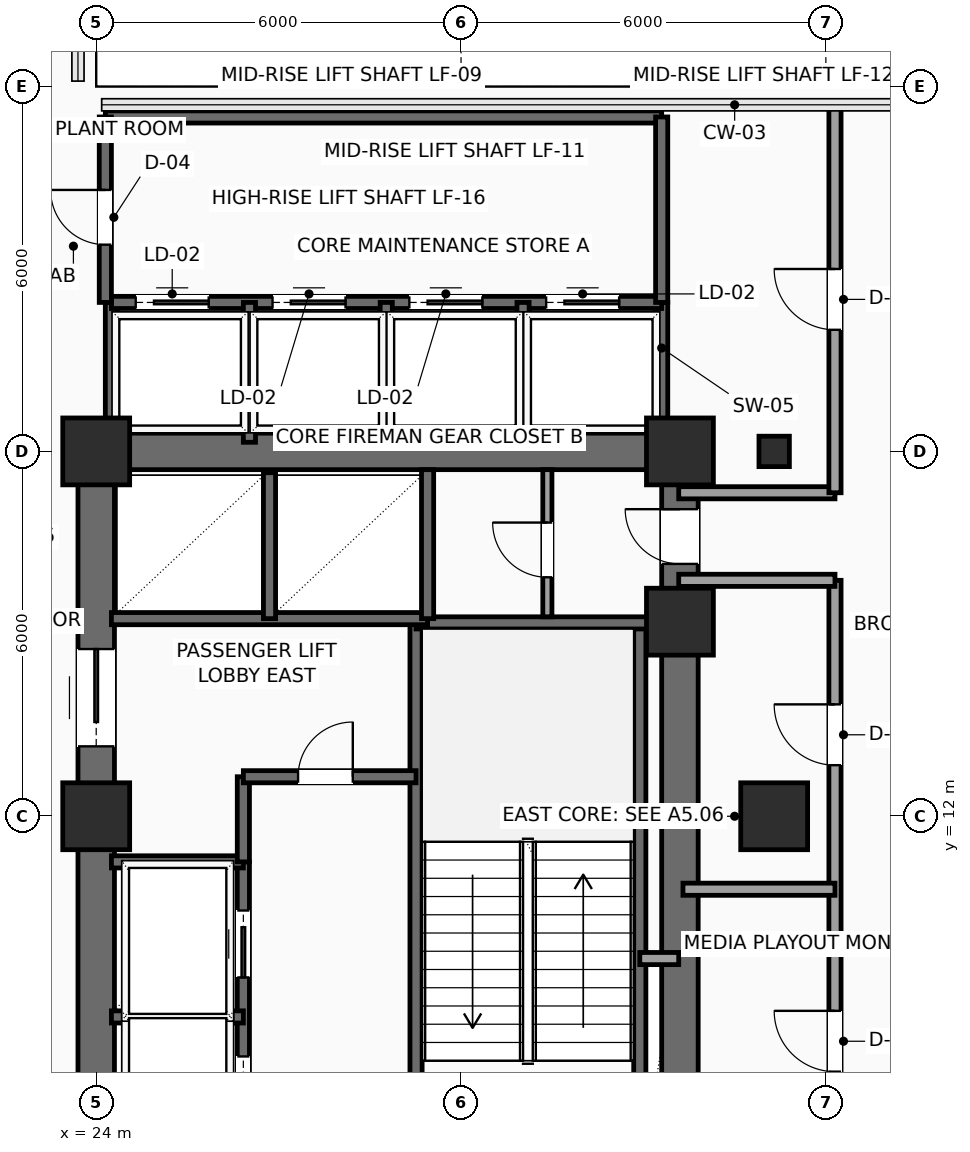
"""IFC4 building model, lengths in metres.
Left out: names, types, materials, properties, quantities, classifications, styles, units other than length and angle.
Written with IfcOpenShell. Run it as: python <this file> out.ifc"""

import sys

from ifc_helpers import new_model, si_unit, direction, frame, frame_2d, origin, origin_2d, place, context, subcontext, project, spatial, rectangle, hollow_rectangle, extrude, element, fill, save


model = new_model("IFC4")
c1 = context("Model", 3, precision=1e-05, world=origin(), true_north=direction((0.0, 1.0)))
c2 = subcontext(c1, "Body", "Model", "MODEL_VIEW")
j1 = project(units=[si_unit("LENGTHUNIT", "METRE"), si_unit("PLANEANGLEUNIT", "RADIAN")], contexts=[c1])
p1 = place(None, origin())
s1 = spatial("IfcSite", under=j1, at=p1, CompositionType="ELEMENT")
p2 = place(p1, origin())
s2 = spatial("IfcBuilding", under=s1, at=p2, CompositionType="ELEMENT")
p3 = place(p2, frame((0.0, 0.0, 115.65)))
s3 = spatial("IfcBuildingStorey", under=s2, at=p3, CompositionType="ELEMENT", Elevation=115.65)
for number, where, z_axis, x_axis in (
    (1, (24.0, 12.0, 0.0), (0.0, 0.0, 1.0), (1.0, 0.0, 0.0)),
    (2, (24.0, 18.0, 0.0), (0.0, 0.0, 1.0), (1.0, 0.0, 0.0)),
    (3, (33.6, 15.2, 0.0), (0.0, 0.0, 1.0), (1.0, 0.0, 0.0)),
    (4, (33.6, 18.0, 0.0), (0.0, 0.0, 1.0), (1.0, 0.0, 0.0)),
    (5, (35.15, 12.0, 0.0), (0.0, 0.0, 1.0), (1.0, 0.0, 0.0)),
):
    element("IfcColumn", number, at=place(p3, frame(where, z_axis=z_axis, x_axis=x_axis)), inside=s3, PredefinedType="COLUMN", context=c2, shape_type="SweptSolid", body=[
        extrude(rectangle(XDim=1.1, YDim=1.1, at=origin_2d()), origin(), (0.0, 0.0, 1.0), 3.75),
    ])
p4 = place(p3, frame((35.15, 18.0, 0.0), z_axis=(0.0, 0.0, 1.0), x_axis=(1.0, 0.0, 0.0)))
e6 = element("IfcColumn", 6, at=p4, inside=s3, PredefinedType="COLUMN", context=c2, shape_type="SweptSolid", body=[
    extrude(hollow_rectangle(XDim=0.5, YDim=0.5, WallThickness=0.025, InnerFilletRadius=0.025, OuterFilletRadius=0.04, at=origin_2d()), origin(), (0.0, 0.0, 1.0), 3.75),
])
p5 = place(p3, frame((24.0, 18.0, 0.0), z_axis=(0.0, 0.0, 1.0), x_axis=(1.0, 0.0, 0.0)))
e7 = element("IfcWall", 7, at=p5, inside=s3, PredefinedType="SHEAR", context=c2, shape_type="SweptSolid", body=[
    extrude(rectangle(XDim=9.6, YDim=0.6, at=frame_2d((4.8, 0.0))), origin(), (0.0, 0.0, 1.0), 3.525),
])
p6 = place(p3, frame((24.0, 6.0, 0.0), z_axis=(0.0, 0.0, 1.0), x_axis=(0.0, 1.0, 0.0)))
e8 = element("IfcWall", 8, at=p6, inside=s3, PredefinedType="SHEAR", context=c2, shape_type="SweptSolid", body=[
    extrude(rectangle(XDim=12.0, YDim=0.6, at=frame_2d((6.0, 0.0))), origin(), (0.0, 0.0, 1.0), 3.525),
])
p7 = place(p6, frame((7.15, 0.0, 0.0)))
e9 = element("IfcOpeningElement", 9, at=p7, cuts=e8, PredefinedType="OPENING", context=c2, shape_type="SweptSolid", body=[
    extrude(rectangle(XDim=1.6, YDim=2.3, at=frame_2d((0.8, 1.15))), frame((0.0, 0.31, 0.0), z_axis=(0.0, -1.0, 0.0), x_axis=(1.0, 0.0, 0.0)), (0.0, 0.0, 1.0), 0.62),
])
p8 = place(p3, frame((33.6, 6.0, 0.0), z_axis=(0.0, 0.0, 1.0), x_axis=(0.0, 1.0, 0.0)))
e10 = element("IfcWall", 10, at=p8, inside=s3, PredefinedType="SHEAR", context=c2, shape_type="SweptSolid", body=[
    extrude(rectangle(XDim=12.0, YDim=0.6, at=frame_2d((6.0, 0.0))), origin(), (0.0, 0.0, 1.0), 3.525),
])
p9 = place(p8, frame((10.15, 0.0, 0.0)))
e11 = element("IfcOpeningElement", 11, at=p9, cuts=e10, PredefinedType="OPENING", context=c2, shape_type="SweptSolid", body=[
    extrude(rectangle(XDim=0.9, YDim=2.15, at=frame_2d((0.45, 1.075))), frame((0.0, 0.31, 0.0), z_axis=(0.0, -1.0, 0.0), x_axis=(1.0, 0.0, 0.0)), (0.0, 0.0, 1.0), 0.62),
])
p10 = place(p3, frame((29.26, 6.3, 0.0), z_axis=(0.0, 0.0, 1.0), x_axis=(0.0, 1.0, 0.0)))
e12 = element("IfcWall", 12, at=p10, inside=s3, PredefinedType="SHEAR", context=c2, shape_type="SweptSolid", body=[
    extrude(rectangle(XDim=8.88, YDim=0.2, at=frame_2d((4.44, 0.0))), origin(), (0.0, 0.0, 1.0), 3.525),
])
p11 = place(p10, frame((0.35, 0.0, 0.0)))
e13 = element("IfcOpeningElement", 13, at=p11, cuts=e12, PredefinedType="OPENING", context=c2, shape_type="SweptSolid", body=[
    extrude(rectangle(XDim=1.1, YDim=2.2, at=frame_2d((0.55, 1.1))), frame((0.0, 0.11, 0.0), z_axis=(0.0, -1.0, 0.0), x_axis=(1.0, 0.0, 0.0)), (0.0, 0.0, 1.0), 0.22),
])
p12 = place(p3, frame((32.94, 6.3, 0.0), z_axis=(0.0, 0.0, 1.0), x_axis=(0.0, 1.0, 0.0)))
e14 = element("IfcWall", 14, at=p12, inside=s3, PredefinedType="SHEAR", context=c2, shape_type="SweptSolid", body=[
    extrude(rectangle(XDim=8.88, YDim=0.2, at=frame_2d((4.44, 0.0))), origin(), (0.0, 0.0, 1.0), 3.525),
])
p13 = place(p3, frame((29.26, 15.18, 0.0), z_axis=(0.0, 0.0, 1.0), x_axis=(1.0, 0.0, 0.0)))
e15 = element("IfcWall", 15, at=p13, inside=s3, PredefinedType="SHEAR", context=c2, shape_type="SweptSolid", body=[
    extrude(rectangle(XDim=4.04, YDim=0.2, at=frame_2d((2.02, 0.0))), origin(), (0.0, 0.0, 1.0), 3.525),
])
p14 = place(p3, frame((26.42, 6.3, 0.0), z_axis=(0.0, 0.0, 1.0), x_axis=(0.0, 1.0, 0.0)))
e16 = element("IfcWall", 16, at=p14, inside=s3, PredefinedType="SHEAR", context=c2, shape_type="SweptSolid", body=[
    extrude(rectangle(XDim=4.95, YDim=0.2, at=frame_2d((2.475, 0.0))), origin(), (0.0, 0.0, 1.0), 3.525),
])
p15 = place(p14, frame((0.65, 0.0, 0.0)))
e17 = element("IfcOpeningElement", 17, at=p15, cuts=e16, PredefinedType="OPENING", context=c2, shape_type="SweptSolid", body=[
    extrude(rectangle(XDim=1.1, YDim=2.2, at=frame_2d((0.55, 1.1))), frame((0.0, 0.11, 0.0), z_axis=(0.0, -1.0, 0.0), x_axis=(1.0, 0.0, 0.0)), (0.0, 0.0, 1.0), 0.22),
])
p16 = place(p14, frame((3.05, 0.0, 0.0)))
e18 = element("IfcOpeningElement", 18, at=p16, cuts=e16, PredefinedType="OPENING", context=c2, shape_type="SweptSolid", body=[
    extrude(rectangle(XDim=1.1, YDim=2.2, at=frame_2d((0.55, 1.1))), frame((0.0, 0.11, 0.0), z_axis=(0.0, -1.0, 0.0), x_axis=(1.0, 0.0, 0.0)), (0.0, 0.0, 1.0), 0.22),
])
for number, where, z_axis, x_axis in (
    (19, (24.25, 8.7, 0.0), (0.0, 0.0, 1.0), (1.0, 0.0, 0.0)),
    (20, (24.25, 11.25, 0.0), (0.0, 0.0, 1.0), (1.0, 0.0, 0.0)),
):
    element("IfcWall", number, at=place(p3, frame(where, z_axis=z_axis, x_axis=x_axis)), inside=s3, PredefinedType="SHEAR", context=c2, shape_type="SweptSolid", body=[
        extrude(rectangle(XDim=2.17, YDim=0.2, at=frame_2d((1.085, 0.0))), origin(), (0.0, 0.0, 1.0), 3.525),
    ])
p17 = place(p3, frame((26.42, 11.25, 0.0), z_axis=(0.0, 0.0, 1.0), x_axis=(0.0, 1.0, 0.0)))
e21 = element("IfcWall", 21, at=p17, inside=s3, PredefinedType="SHEAR", context=c2, shape_type="SweptSolid", body=[
    extrude(rectangle(XDim=1.4, YDim=0.2, at=frame_2d((0.7, 0.0))), origin(), (0.0, 0.0, 1.0), 3.525),
])
p18 = place(p3, frame((26.42, 12.65, 0.0), z_axis=(0.0, 0.0, 1.0), x_axis=(1.0, 0.0, 0.0)))
e22 = element("IfcWall", 22, at=p18, inside=s3, PredefinedType="SHEAR", context=c2, shape_type="SweptSolid", body=[
    extrude(rectangle(XDim=2.84, YDim=0.2, at=frame_2d((1.42, 0.0))), origin(), (0.0, 0.0, 1.0), 3.525),
])
p19 = place(p18, frame((0.9, 0.0, 0.0)))
e23 = element("IfcOpeningElement", 23, at=p19, cuts=e22, PredefinedType="OPENING", context=c2, shape_type="SweptSolid", body=[
    extrude(rectangle(XDim=0.9, YDim=2.15, at=frame_2d((0.45, 1.075))), frame((0.0, 0.11, 0.0), z_axis=(0.0, -1.0, 0.0), x_axis=(1.0, 0.0, 0.0)), (0.0, 0.0, 1.0), 0.22),
])
p20 = place(p3, frame((32.94, 9.66, 0.0), z_axis=(0.0, 0.0, 1.0), x_axis=(1.0, 0.0, 0.0)))
e24 = element("IfcWall", 24, at=p20, inside=s3, PredefinedType="SOLIDWALL", context=c2, shape_type="SweptSolid", body=[
    extrude(rectangle(XDim=0.64, YDim=0.2, at=frame_2d((0.32, 0.0))), origin(), (0.0, 0.0, 1.0), 3.525),
])
p21 = place(p3, frame((24.25, 15.25, 0.0), z_axis=(0.0, 0.0, 1.0), x_axis=(1.0, 0.0, 0.0)))
e25 = element("IfcWall", 25, at=p21, inside=s3, PredefinedType="SHEAR", context=c2, shape_type="SweptSolid", body=[
    extrude(rectangle(XDim=5.2, YDim=0.2, at=frame_2d((2.6, 0.0))), origin(), (0.0, 0.0, 1.0), 3.525),
])
p22 = place(p3, frame((26.85, 15.25, 0.0), z_axis=(0.0, 0.0, 1.0), x_axis=(0.0, 1.0, 0.0)))
e26 = element("IfcWall", 26, at=p22, inside=s3, PredefinedType="SHEAR", context=c2, shape_type="SweptSolid", body=[
    extrude(rectangle(XDim=2.4, YDim=0.2, at=frame_2d((1.2, 0.0))), origin(), (0.0, 0.0, 1.0), 3.525),
])
p23 = place(p3, frame((29.45, 15.25, 0.0), z_axis=(0.0, 0.0, 1.0), x_axis=(0.0, 1.0, 0.0)))
e27 = element("IfcWall", 27, at=p23, inside=s3, PredefinedType="SHEAR", context=c2, shape_type="SweptSolid", body=[
    extrude(rectangle(XDim=2.45, YDim=0.2, at=frame_2d((1.225, 0.0))), origin(), (0.0, 0.0, 1.0), 3.525),
])
p24 = place(p3, frame((31.42, 15.28, 0.0), z_axis=(0.0, 0.0, 1.0), x_axis=(0.0, 1.0, 0.0)))
e28 = element("IfcWall", 28, at=p24, inside=s3, PredefinedType="PARTITIONING", context=c2, shape_type="SweptSolid", body=[
    extrude(rectangle(XDim=2.42, YDim=0.15, at=frame_2d((1.21, 0.0))), origin(), (0.0, 0.0, 1.0), 3.525),
])
p25 = place(p24, frame((0.65, 0.0, 0.0)))
e29 = element("IfcOpeningElement", 29, at=p25, cuts=e28, PredefinedType="OPENING", context=c2, shape_type="SweptSolid", body=[
    extrude(rectangle(XDim=0.9, YDim=2.15, at=frame_2d((0.45, 1.075))), frame((0.0, 0.085, 0.0), z_axis=(0.0, -1.0, 0.0), x_axis=(1.0, 0.0, 0.0)), (0.0, 0.0, 1.0), 0.17),
])
for number, where, z_axis, x_axis in (
    (30, (33.3, 18.1, 0.0), (0.0, 0.0, 1.0), (0.0, 1.0, 0.0)),
    (31, (24.25, 18.1, 0.0), (0.0, 0.0, 1.0), (0.0, 1.0, 0.0)),
):
    element("IfcWall", number, at=place(p3, frame(where, z_axis=z_axis, x_axis=x_axis)), inside=s3, PredefinedType="SHEAR", context=c2, shape_type="SweptSolid", body=[
        extrude(rectangle(XDim=2.35, YDim=0.2, at=frame_2d((1.175, 0.0))), origin(), (0.0, 0.0, 1.0), 3.525),
    ])
p26 = place(p3, frame((24.25, 20.45, 0.0), z_axis=(0.0, 0.0, 1.0), x_axis=(1.0, 0.0, 0.0)))
e32 = element("IfcWall", 32, at=p26, inside=s3, PredefinedType="SHEAR", context=c2, shape_type="SweptSolid", body=[
    extrude(rectangle(XDim=9.05, YDim=0.2, at=frame_2d((4.525, 0.0))), origin(), (0.0, 0.0, 1.0), 3.525),
])
p27 = place(p26, frame((0.4, 0.0, 0.0)))
e33 = element("IfcOpeningElement", 33, at=p27, cuts=e32, PredefinedType="OPENING", context=c2, shape_type="SweptSolid", body=[
    extrude(rectangle(XDim=1.2, YDim=2.2, at=frame_2d((0.6, 1.1))), frame((0.0, 0.11, 0.0), z_axis=(0.0, -1.0, 0.0), x_axis=(1.0, 0.0, 0.0)), (0.0, 0.0, 1.0), 0.22),
])
p28 = place(p26, frame((2.65, 0.0, 0.0)))
e34 = element("IfcOpeningElement", 34, at=p28, cuts=e32, PredefinedType="OPENING", context=c2, shape_type="SweptSolid", body=[
    extrude(rectangle(XDim=1.2, YDim=2.2, at=frame_2d((0.6, 1.1))), frame((0.0, 0.11, 0.0), z_axis=(0.0, -1.0, 0.0), x_axis=(1.0, 0.0, 0.0)), (0.0, 0.0, 1.0), 0.22),
])
p29 = place(p26, frame((4.9, 0.0, 0.0)))
e35 = element("IfcOpeningElement", 35, at=p29, cuts=e32, PredefinedType="OPENING", context=c2, shape_type="SweptSolid", body=[
    extrude(rectangle(XDim=1.2, YDim=2.2, at=frame_2d((0.6, 1.1))), frame((0.0, 0.11, 0.0), z_axis=(0.0, -1.0, 0.0), x_axis=(1.0, 0.0, 0.0)), (0.0, 0.0, 1.0), 0.22),
])
p30 = place(p26, frame((7.15, 0.0, 0.0)))
e36 = element("IfcOpeningElement", 36, at=p30, cuts=e32, PredefinedType="OPENING", context=c2, shape_type="SweptSolid", body=[
    extrude(rectangle(XDim=1.2, YDim=2.2, at=frame_2d((0.6, 1.1))), frame((0.0, 0.11, 0.0), z_axis=(0.0, -1.0, 0.0), x_axis=(1.0, 0.0, 0.0)), (0.0, 0.0, 1.0), 0.22),
])
for number, where, z_axis, x_axis in (
    (37, (26.52, 18.15, 0.0), (0.0, 0.0, 1.0), (0.0, 1.0, 0.0)),
    (38, (28.77, 18.15, 0.0), (0.0, 0.0, 1.0), (0.0, 1.0, 0.0)),
    (39, (31.02, 18.15, 0.0), (0.0, 0.0, 1.0), (0.0, 1.0, 0.0)),
):
    element("IfcWall", number, at=place(p3, frame(where, z_axis=z_axis, x_axis=x_axis)), inside=s3, PredefinedType="SHEAR", context=c2, shape_type="SweptSolid", body=[
        extrude(rectangle(XDim=2.3, YDim=0.2, at=frame_2d((1.15, 0.0))), origin(), (0.0, 0.0, 1.0), 3.525),
    ])
p31 = place(p3, frame((24.15, 23.5, 0.0), z_axis=(0.0, 0.0, 1.0), x_axis=(1.0, 0.0, 0.0)))
e40 = element("IfcWall", 40, at=p31, inside=s3, PredefinedType="SHEAR", context=c2, shape_type="SweptSolid", body=[
    extrude(rectangle(XDim=9.15, YDim=0.2, at=frame_2d((4.575, 0.0))), origin(), (0.0, 0.0, 1.0), 3.525),
])
p32 = place(p3, frame((33.3, 20.45, 0.0), z_axis=(0.0, 0.0, 1.0), x_axis=(0.0, 1.0, 0.0)))
e41 = element("IfcWall", 41, at=p32, inside=s3, PredefinedType="SHEAR", context=c2, shape_type="SweptSolid", body=[
    extrude(rectangle(XDim=3.05, YDim=0.2, at=frame_2d((1.525, 0.0))), origin(), (0.0, 0.0, 1.0), 3.525),
])
p33 = place(p3, frame((24.15, 20.45, 0.0), z_axis=(0.0, 0.0, 1.0), x_axis=(0.0, 1.0, 0.0)))
e42 = element("IfcWall", 42, at=p33, inside=s3, PredefinedType="SHEAR", context=c2, shape_type="SweptSolid", body=[
    extrude(rectangle(XDim=3.05, YDim=0.2, at=frame_2d((1.525, 0.0))), origin(), (0.0, 0.0, 1.0), 3.525),
])
p34 = place(p33, frame((0.95, 0.0, 0.0)))
e43 = element("IfcOpeningElement", 43, at=p34, cuts=e42, PredefinedType="OPENING", context=c2, shape_type="SweptSolid", body=[
    extrude(rectangle(XDim=0.9, YDim=2.15, at=frame_2d((0.45, 1.075))), frame((0.0, 0.11, 0.0), z_axis=(0.0, -1.0, 0.0), x_axis=(1.0, 0.0, 0.0)), (0.0, 0.0, 1.0), 0.22),
])
p35 = place(p3, frame((36.15, 5.8, 0.0), z_axis=(0.0, 0.0, 1.0), x_axis=(0.0, 1.0, 0.0)))
e44 = element("IfcWall", 44, at=p35, inside=s3, PredefinedType="SOLIDWALL", context=c2, shape_type="SweptSolid", body=[
    extrude(rectangle(XDim=10.08, YDim=0.2, at=frame_2d((5.04, 0.0))), origin(), (0.0, 0.0, 1.0), 3.525),
])
p36 = place(p35, frame((2.0, 0.0, 0.0)))
e45 = element("IfcOpeningElement", 45, at=p36, cuts=e44, PredefinedType="OPENING", context=c2, shape_type="SweptSolid", body=[
    extrude(rectangle(XDim=1.0, YDim=2.2, at=frame_2d((0.5, 1.1))), frame((0.0, 0.11, 0.0), z_axis=(0.0, -1.0, 0.0), x_axis=(1.0, 0.0, 0.0)), (0.0, 0.0, 1.0), 0.22),
])
p37 = place(p35, frame((7.04, 0.0, 0.0)))
e46 = element("IfcOpeningElement", 46, at=p37, cuts=e44, PredefinedType="OPENING", context=c2, shape_type="SweptSolid", body=[
    extrude(rectangle(XDim=1.0, YDim=2.2, at=frame_2d((0.5, 1.1))), frame((0.0, 0.11, 0.0), z_axis=(0.0, -1.0, 0.0), x_axis=(1.0, 0.0, 0.0)), (0.0, 0.0, 1.0), 0.22),
])
for number, where, z_axis, x_axis in (
    (47, (36.15, 15.88, 0.0), (0.0, 0.0, 1.0), (-1.0, 0.0, 0.0)),
    (48, (33.58, 17.32, 0.0), (0.0, 0.0, 1.0), (1.0, 0.0, 0.0)),
):
    element("IfcWall", number, at=place(p3, frame(where, z_axis=z_axis, x_axis=x_axis)), inside=s3, PredefinedType="SOLIDWALL", context=c2, shape_type="SweptSolid", body=[
        extrude(rectangle(XDim=2.57, YDim=0.2, at=frame_2d((1.285, 0.0))), origin(), (0.0, 0.0, 1.0), 3.525),
    ])
p38 = place(p3, frame((36.15, 17.32, 0.0), z_axis=(0.0, 0.0, 1.0), x_axis=(0.0, 1.0, 0.0)))
e49 = element("IfcWall", 49, at=p38, inside=s3, PredefinedType="SOLIDWALL", context=c2, shape_type="SweptSolid", body=[
    extrude(rectangle(XDim=6.38, YDim=0.2, at=frame_2d((3.19, 0.0))), origin(), (0.0, 0.0, 1.0), 3.525),
])
p39 = place(p38, frame((2.68, 0.0, 0.0)))
e50 = element("IfcOpeningElement", 50, at=p39, cuts=e49, PredefinedType="OPENING", context=c2, shape_type="SweptSolid", body=[
    extrude(rectangle(XDim=1.0, YDim=2.2, at=frame_2d((0.5, 1.1))), frame((0.0, 0.11, 0.0), z_axis=(0.0, -1.0, 0.0), x_axis=(1.0, 0.0, 0.0)), (0.0, 0.0, 1.0), 0.22),
])
p40 = place(p3, frame((33.65, 10.8, 0.0), z_axis=(0.0, 0.0, 1.0), x_axis=(1.0, 0.0, 0.0)))
e51 = element("IfcWall", 51, at=p40, inside=s3, PredefinedType="PARTITIONING", context=c2, shape_type="SweptSolid", body=[
    extrude(rectangle(XDim=2.5, YDim=0.2, at=frame_2d((1.25, 0.0))), origin(), (0.0, 0.0, 1.0), 3.525),
])
p41 = place(p7, origin())
e52 = element("IfcDoor", 52, at=p41, inside=s3, OperationType="DOUBLE_DOOR_SLIDING", PredefinedType="DOOR", context=c2, shape_type="SweptSolid", body=[
    extrude(rectangle(XDim=1.6, YDim=2.3, at=frame_2d((0.8, 1.15))), frame((0.0, 0.025, 0.0), z_axis=(0.0, -1.0, 0.0), x_axis=(1.0, 0.0, 0.0)), (0.0, 0.0, 1.0), 0.05),
])
fill(e9, e52)
p42 = place(p9, origin())
e53 = element("IfcDoor", 53, at=p42, inside=s3, OperationType="SINGLE_SWING_RIGHT", PredefinedType="DOOR", context=c2, shape_type="SweptSolid", body=[
    extrude(rectangle(XDim=0.9, YDim=2.15, at=frame_2d((0.45, 1.075))), frame((0.0, 0.025, 0.0), z_axis=(0.0, -1.0, 0.0), x_axis=(1.0, 0.0, 0.0)), (0.0, 0.0, 1.0), 0.05),
])
fill(e11, e53)
p43 = place(p15, origin())
e54 = element("IfcDoor", 54, at=p43, inside=s3, OperationType="SLIDING_TO_LEFT", PredefinedType="DOOR", context=c2, shape_type="SweptSolid", body=[
    extrude(rectangle(XDim=1.1, YDim=2.2, at=frame_2d((0.55, 1.1))), frame((0.0, 0.025, 0.0), z_axis=(0.0, -1.0, 0.0), x_axis=(1.0, 0.0, 0.0)), (0.0, 0.0, 1.0), 0.05),
])
fill(e17, e54)
p44 = place(p16, origin())
e55 = element("IfcDoor", 55, at=p44, inside=s3, OperationType="SLIDING_TO_LEFT", PredefinedType="DOOR", context=c2, shape_type="SweptSolid", body=[
    extrude(rectangle(XDim=1.1, YDim=2.2, at=frame_2d((0.55, 1.1))), frame((0.0, 0.025, 0.0), z_axis=(0.0, -1.0, 0.0), x_axis=(1.0, 0.0, 0.0)), (0.0, 0.0, 1.0), 0.05),
])
fill(e18, e55)
p45 = place(p19, origin())
e56 = element("IfcDoor", 56, at=p45, inside=s3, OperationType="SINGLE_SWING_RIGHT", PredefinedType="DOOR", context=c2, shape_type="SweptSolid", body=[
    extrude(rectangle(XDim=0.9, YDim=2.15, at=frame_2d((0.45, 1.075))), frame((0.0, 0.025, 0.0), z_axis=(0.0, -1.0, 0.0), x_axis=(1.0, 0.0, 0.0)), (0.0, 0.0, 1.0), 0.05),
])
fill(e23, e56)
p46 = place(p25, origin())
e57 = element("IfcDoor", 57, at=p46, inside=s3, OperationType="SINGLE_SWING_RIGHT", PredefinedType="DOOR", context=c2, shape_type="SweptSolid", body=[
    extrude(rectangle(XDim=0.9, YDim=2.15, at=frame_2d((0.45, 1.075))), frame((0.0, 0.025, 0.0), z_axis=(0.0, -1.0, 0.0), x_axis=(1.0, 0.0, 0.0)), (0.0, 0.0, 1.0), 0.05),
])
fill(e29, e57)
p47 = place(p27, origin())
e58 = element("IfcDoor", 58, at=p47, inside=s3, OperationType="SLIDING_TO_RIGHT", PredefinedType="DOOR", context=c2, shape_type="SweptSolid", body=[
    extrude(rectangle(XDim=1.2, YDim=2.2, at=frame_2d((0.6, 1.1))), frame((0.0, 0.025, 0.0), z_axis=(0.0, -1.0, 0.0), x_axis=(1.0, 0.0, 0.0)), (0.0, 0.0, 1.0), 0.05),
])
fill(e33, e58)
p48 = place(p28, origin())
e59 = element("IfcDoor", 59, at=p48, inside=s3, OperationType="SLIDING_TO_RIGHT", PredefinedType="DOOR", context=c2, shape_type="SweptSolid", body=[
    extrude(rectangle(XDim=1.2, YDim=2.2, at=frame_2d((0.6, 1.1))), frame((0.0, 0.025, 0.0), z_axis=(0.0, -1.0, 0.0), x_axis=(1.0, 0.0, 0.0)), (0.0, 0.0, 1.0), 0.05),
])
fill(e34, e59)
p49 = place(p29, origin())
e60 = element("IfcDoor", 60, at=p49, inside=s3, OperationType="SLIDING_TO_RIGHT", PredefinedType="DOOR", context=c2, shape_type="SweptSolid", body=[
    extrude(rectangle(XDim=1.2, YDim=2.2, at=frame_2d((0.6, 1.1))), frame((0.0, 0.025, 0.0), z_axis=(0.0, -1.0, 0.0), x_axis=(1.0, 0.0, 0.0)), (0.0, 0.0, 1.0), 0.05),
])
fill(e35, e60)
p50 = place(p30, origin())
e61 = element("IfcDoor", 61, at=p50, inside=s3, OperationType="SLIDING_TO_RIGHT", PredefinedType="DOOR", context=c2, shape_type="SweptSolid", body=[
    extrude(rectangle(XDim=1.2, YDim=2.2, at=frame_2d((0.6, 1.1))), frame((0.0, 0.025, 0.0), z_axis=(0.0, -1.0, 0.0), x_axis=(1.0, 0.0, 0.0)), (0.0, 0.0, 1.0), 0.05),
])
fill(e36, e61)
p51 = place(p34, origin())
e62 = element("IfcDoor", 62, at=p51, inside=s3, OperationType="SINGLE_SWING_RIGHT", PredefinedType="DOOR", context=c2, shape_type="SweptSolid", body=[
    extrude(rectangle(XDim=0.9, YDim=2.15, at=frame_2d((0.45, 1.075))), frame((0.0, 0.025, 0.0), z_axis=(0.0, -1.0, 0.0), x_axis=(1.0, 0.0, 0.0)), (0.0, 0.0, 1.0), 0.05),
])
fill(e43, e62)
p52 = place(p36, origin())
e63 = element("IfcDoor", 63, at=p52, inside=s3, OperationType="SINGLE_SWING_RIGHT", PredefinedType="DOOR", context=c2, shape_type="SweptSolid", body=[
    extrude(rectangle(XDim=1.0, YDim=2.2, at=frame_2d((0.5, 1.1))), frame((0.0, 0.025, 0.0), z_axis=(0.0, -1.0, 0.0), x_axis=(1.0, 0.0, 0.0)), (0.0, 0.0, 1.0), 0.05),
])
fill(e45, e63)
p53 = place(p37, origin())
e64 = element("IfcDoor", 64, at=p53, inside=s3, OperationType="SINGLE_SWING_RIGHT", PredefinedType="DOOR", context=c2, shape_type="SweptSolid", body=[
    extrude(rectangle(XDim=1.0, YDim=2.2, at=frame_2d((0.5, 1.1))), frame((0.0, 0.025, 0.0), z_axis=(0.0, -1.0, 0.0), x_axis=(1.0, 0.0, 0.0)), (0.0, 0.0, 1.0), 0.05),
])
fill(e46, e64)
p54 = place(p39, origin())
e65 = element("IfcDoor", 65, at=p54, inside=s3, OperationType="SINGLE_SWING_RIGHT", PredefinedType="DOOR", context=c2, shape_type="SweptSolid", body=[
    extrude(rectangle(XDim=1.0, YDim=2.2, at=frame_2d((0.5, 1.1))), frame((0.0, 0.025, 0.0), z_axis=(0.0, -1.0, 0.0), x_axis=(1.0, 0.0, 0.0)), (0.0, 0.0, 1.0), 0.05),
])
fill(e50, e65)
save(model, sys.argv[1])
